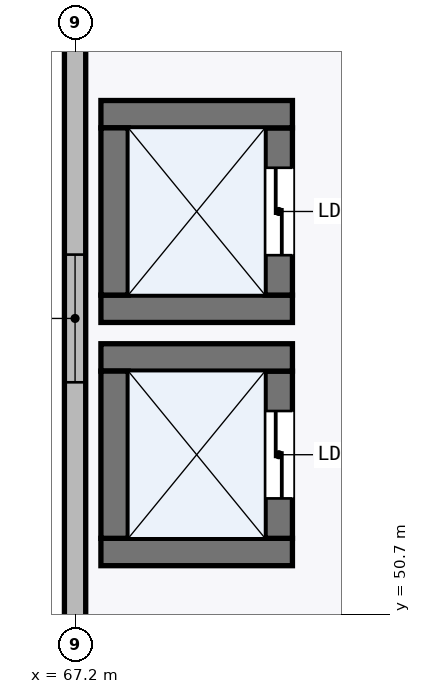
"""IFC4 building model, lengths in metres.
Left out: names, types, materials, properties, quantities, classifications, styles, units other than length and angle.
Written with IfcOpenShell. Run it as: python <this file> out.ifc"""

import sys

from ifc_helpers import new_model, si_unit, direction, frame, frame_2d, origin, place, context, subcontext, project, spatial, rectangle, extrude, element, fill, save


model = new_model("IFC4")
c1 = context("Model", 3, precision=1e-05, world=origin(), true_north=direction((0.0, 1.0)))
c2 = subcontext(c1, "Body", "Model", "MODEL_VIEW")
j1 = project(units=[si_unit("LENGTHUNIT", "METRE"), si_unit("PLANEANGLEUNIT", "RADIAN")], contexts=[c1])
p1 = place(None, origin())
s1 = spatial("IfcSite", under=j1, at=p1, CompositionType="ELEMENT")
p2 = place(p1, origin())
s2 = spatial("IfcBuilding", under=s1, at=p2, CompositionType="ELEMENT")
p3 = place(p2, frame((0.0, 0.0, 16.5)))
s3 = spatial("IfcBuildingStorey", under=s2, at=p3, CompositionType="ELEMENT", Elevation=16.5)
p4 = place(p3, frame((67.2, 58.602, 0.0), z_axis=(0.0, 0.0, 1.0), x_axis=(0.0, -1.0, 0.0)))
e1 = element("IfcWall", 1, at=p4, inside=s3, PredefinedType="STANDARD", context=c2, shape_type="SweptSolid", body=[
    extrude(rectangle(XDim=8.019, YDim=0.28, at=frame_2d((4.009, 0.0))), origin(), (0.0, 0.0, 1.0), 4.487),
])
p5 = place(p4, frame((3.169, 0.0, 0.95)))
e2 = element("IfcOpeningElement", 2, at=p5, cuts=e1, PredefinedType="OPENING", context=c2, shape_type="SweptSolid", body=[
    extrude(rectangle(XDim=1.68, YDim=1.8, at=frame_2d((0.84, 0.9))), frame((0.0, 0.15, 0.0), z_axis=(0.0, -1.0, 0.0), x_axis=(1.0, 0.0, 0.0)), (0.0, 0.0, 1.0), 0.3),
])
p6 = place(p3, frame((67.54, 51.52, 0.0), z_axis=(0.0, 0.0, 1.0), x_axis=(1.0, 0.0, 0.0)))
e3 = element("IfcWall", 3, at=p6, inside=s3, PredefinedType="SHEAR", context=c2, shape_type="SweptSolid", body=[
    extrude(rectangle(XDim=2.52, YDim=0.36, at=frame_2d((1.26, 0.0))), origin(), (0.0, 0.0, 1.0), 4.095),
])
p7 = place(p3, frame((69.88, 51.7, 0.0), z_axis=(0.0, 0.0, 1.0), x_axis=(0.0, 1.0, 0.0)))
e4 = element("IfcWall", 4, at=p7, inside=s3, PredefinedType="SHEAR", context=c2, shape_type="SweptSolid", body=[
    extrude(rectangle(XDim=2.2, YDim=0.36, at=frame_2d((1.1, 0.0))), origin(), (0.0, 0.0, 1.0), 4.095),
])
p8 = place(p7, frame((0.525, 0.0, 0.0)))
e5 = element("IfcOpeningElement", 5, at=p8, cuts=e4, PredefinedType="OPENING", context=c2, shape_type="SweptSolid", body=[
    extrude(rectangle(XDim=1.15, YDim=2.2, at=frame_2d((0.575, 1.1))), frame((0.0, 0.19, 0.0), z_axis=(0.0, -1.0, 0.0), x_axis=(1.0, 0.0, 0.0)), (0.0, 0.0, 1.0), 0.38),
])
p9 = place(p3, frame((70.06, 54.08, 0.0), z_axis=(0.0, 0.0, 1.0), x_axis=(-1.0, 0.0, 0.0)))
e6 = element("IfcWall", 6, at=p9, inside=s3, PredefinedType="SHEAR", context=c2, shape_type="SweptSolid", body=[
    extrude(rectangle(XDim=2.52, YDim=0.36, at=frame_2d((1.26, 0.0))), origin(), (0.0, 0.0, 1.0), 4.095),
])
p10 = place(p3, frame((67.72, 53.9, 0.0), z_axis=(0.0, 0.0, 1.0), x_axis=(0.0, -1.0, 0.0)))
e7 = element("IfcWall", 7, at=p10, inside=s3, PredefinedType="SHEAR", context=c2, shape_type="SweptSolid", body=[
    extrude(rectangle(XDim=2.2, YDim=0.36, at=frame_2d((1.1, 0.0))), origin(), (0.0, 0.0, 1.0), 4.095),
])
p11 = place(p3, frame((67.54, 54.72, 0.0), z_axis=(0.0, 0.0, 1.0), x_axis=(1.0, 0.0, 0.0)))
e8 = element("IfcWall", 8, at=p11, inside=s3, PredefinedType="SHEAR", context=c2, shape_type="SweptSolid", body=[
    extrude(rectangle(XDim=2.52, YDim=0.36, at=frame_2d((1.26, 0.0))), origin(), (0.0, 0.0, 1.0), 4.095),
])
p12 = place(p3, frame((69.88, 54.9, 0.0), z_axis=(0.0, 0.0, 1.0), x_axis=(0.0, 1.0, 0.0)))
e9 = element("IfcWall", 9, at=p12, inside=s3, PredefinedType="SHEAR", context=c2, shape_type="SweptSolid", body=[
    extrude(rectangle(XDim=2.2, YDim=0.36, at=frame_2d((1.1, 0.0))), origin(), (0.0, 0.0, 1.0), 4.095),
])
p13 = place(p12, frame((0.525, 0.0, 0.0)))
e10 = element("IfcOpeningElement", 10, at=p13, cuts=e9, PredefinedType="OPENING", context=c2, shape_type="SweptSolid", body=[
    extrude(rectangle(XDim=1.15, YDim=2.2, at=frame_2d((0.575, 1.1))), frame((0.0, 0.19, 0.0), z_axis=(0.0, -1.0, 0.0), x_axis=(1.0, 0.0, 0.0)), (0.0, 0.0, 1.0), 0.38),
])
p14 = place(p3, frame((70.06, 57.28, 0.0), z_axis=(0.0, 0.0, 1.0), x_axis=(-1.0, 0.0, 0.0)))
e11 = element("IfcWall", 11, at=p14, inside=s3, PredefinedType="SHEAR", context=c2, shape_type="SweptSolid", body=[
    extrude(rectangle(XDim=2.52, YDim=0.36, at=frame_2d((1.26, 0.0))), origin(), (0.0, 0.0, 1.0), 4.095),
])
p15 = place(p3, frame((67.72, 57.1, 0.0), z_axis=(0.0, 0.0, 1.0), x_axis=(0.0, -1.0, 0.0)))
e12 = element("IfcWall", 12, at=p15, inside=s3, PredefinedType="SHEAR", context=c2, shape_type="SweptSolid", body=[
    extrude(rectangle(XDim=2.2, YDim=0.36, at=frame_2d((1.1, 0.0))), origin(), (0.0, 0.0, 1.0), 4.095),
])
p16 = place(p5, origin())
e13 = element("IfcWindow", 13, at=p16, inside=s3, PartitioningType="SINGLE_PANEL", PredefinedType="WINDOW", context=c2, shape_type="SweptSolid", body=[
    extrude(rectangle(XDim=1.68, YDim=1.8, at=frame_2d((0.84, 0.9))), frame((0.0, 0.03, 0.0), z_axis=(0.0, -1.0, 0.0), x_axis=(1.0, 0.0, 0.0)), (0.0, 0.0, 1.0), 0.06),
])
fill(e2, e13)
p17 = place(p8, frame((1.15, 0.0, 0.0), z_axis=(0.0, 0.0, 1.0), x_axis=(-1.0, 0.0, 0.0)))
e14 = element("IfcDoor", 14, at=p17, inside=s3, OperationType="DOUBLE_DOOR_SLIDING", PredefinedType="DOOR", context=c2, shape_type="SweptSolid", body=[
    extrude(rectangle(XDim=1.15, YDim=2.2, at=frame_2d((0.575, 1.1))), frame((0.0, 0.025, 0.0), z_axis=(0.0, -1.0, 0.0), x_axis=(1.0, 0.0, 0.0)), (0.0, 0.0, 1.0), 0.05),
])
fill(e5, e14)
p18 = place(p13, frame((1.15, 0.0, 0.0), z_axis=(0.0, 0.0, 1.0), x_axis=(-1.0, 0.0, 0.0)))
e15 = element("IfcDoor", 15, at=p18, inside=s3, OperationType="DOUBLE_DOOR_SLIDING", PredefinedType="DOOR", context=c2, shape_type="SweptSolid", body=[
    extrude(rectangle(XDim=1.15, YDim=2.2, at=frame_2d((0.575, 1.1))), frame((0.0, 0.025, 0.0), z_axis=(0.0, -1.0, 0.0), x_axis=(1.0, 0.0, 0.0)), (0.0, 0.0, 1.0), 0.05),
])
fill(e10, e15)
save(model, sys.argv[1])
